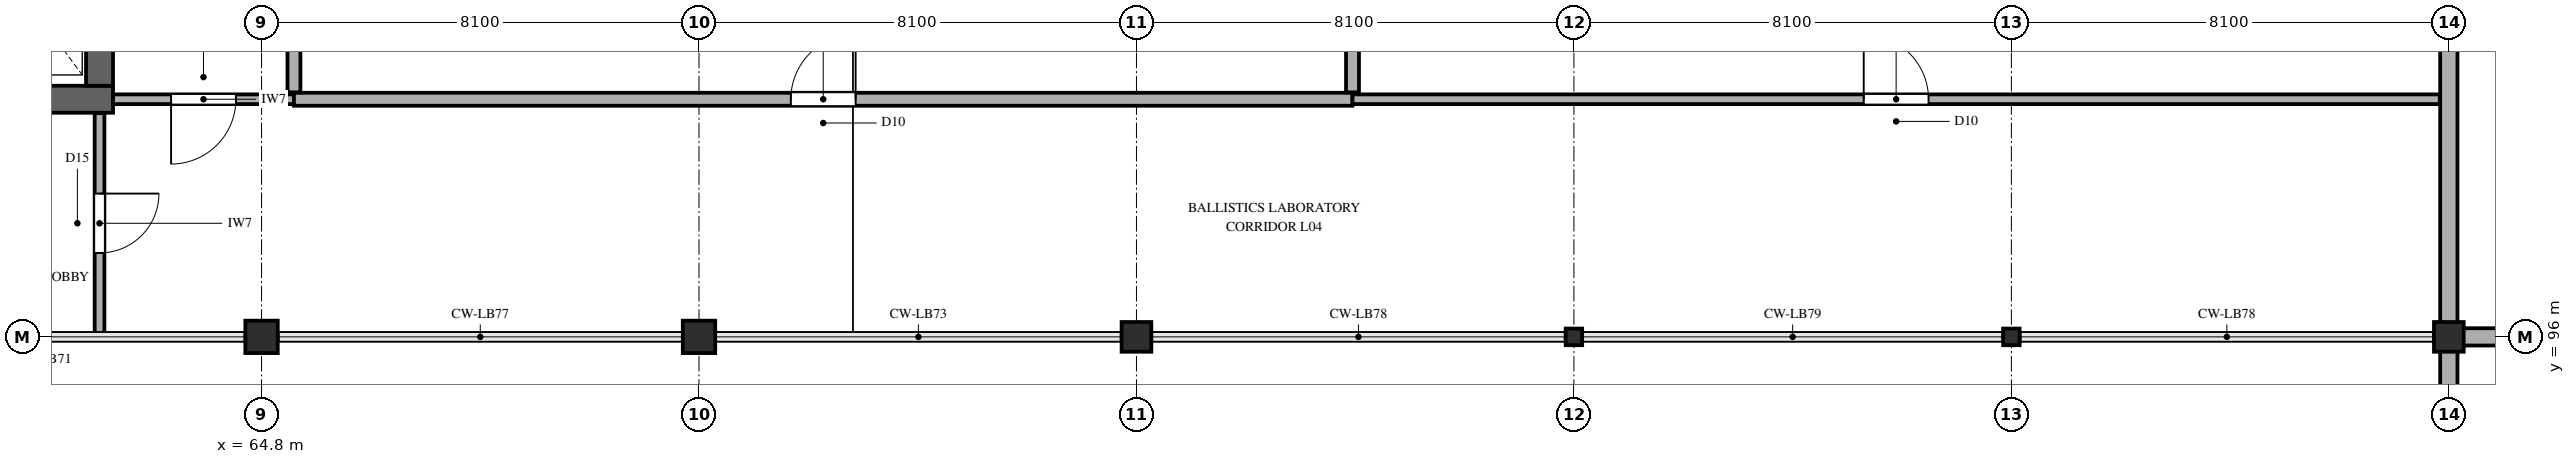
"""IFC4 building model, lengths in metres.
Left out: names, types, materials, properties, quantities, classifications, styles, units other than length and angle.
Written with IfcOpenShell. Run it as: python <this file> out.ifc"""

import sys

from ifc_helpers import new_model, si_unit, direction, frame, frame_2d, origin, origin_2d, place, context, subcontext, project, spatial, rectangle, i_section, extrude, element, fill, save


model = new_model("IFC4")
c1 = context("Model", 3, precision=1e-05, world=origin(), true_north=direction((0.0, 1.0)))
c2 = subcontext(c1, "Body", "Model", "MODEL_VIEW")
j1 = project(units=[si_unit("LENGTHUNIT", "METRE"), si_unit("PLANEANGLEUNIT", "RADIAN")], contexts=[c1])
p1 = place(None, origin())
s1 = spatial("IfcSite", under=j1, at=p1, CompositionType="ELEMENT")
p2 = place(p1, origin())
s2 = spatial("IfcBuilding", under=s1, at=p2, CompositionType="ELEMENT")
p3 = place(p2, frame((0.0, 0.0, 19.8)))
s3 = spatial("IfcBuildingStorey", under=s2, at=p3, CompositionType="ELEMENT", Elevation=19.8)
p4 = place(p3, frame((46.75, 100.4, 0.0), z_axis=(0.0, 0.0, 1.0), x_axis=(1.0, 0.0, 0.0)))
e1 = element("IfcWall", 1, at=p4, inside=s3, PredefinedType="SHEAR", context=c2, shape_type="SweptSolid", body=[
    extrude(rectangle(XDim=15.3, YDim=0.5, at=frame_2d((7.65, 0.0))), origin(), (0.0, 0.0, 1.0), 5.1),
])
p5 = place(p4, frame((1.0, 0.0, 0.0)))
e2 = element("IfcOpeningElement", 2, at=p5, cuts=e1, PredefinedType="OPENING", context=c2, shape_type="SweptSolid", body=[
    extrude(rectangle(XDim=1.15, YDim=2.25, at=frame_2d((0.575, 1.125))), frame((0.0, 0.26, 0.0), z_axis=(0.0, -1.0, 0.0), x_axis=(1.0, 0.0, 0.0)), (0.0, 0.0, 1.0), 0.52),
])
p6 = place(p4, frame((10.282, 0.0, 0.0)))
e3 = element("IfcOpeningElement", 3, at=p6, cuts=e1, PredefinedType="OPENING", context=c2, shape_type="SweptSolid", body=[
    extrude(rectangle(XDim=1.1, YDim=2.2, at=frame_2d((0.55, 1.1))), frame((0.0, 0.26, 0.0), z_axis=(0.0, -1.0, 0.0), x_axis=(1.0, 0.0, 0.0)), (0.0, 0.0, 1.0), 0.52),
])
p7 = place(p4, frame((12.998, 0.0, 0.0)))
e4 = element("IfcOpeningElement", 4, at=p7, cuts=e1, PredefinedType="OPENING", context=c2, shape_type="SweptSolid", body=[
    extrude(rectangle(XDim=1.1, YDim=2.2, at=frame_2d((0.55, 1.1))), frame((0.0, 0.26, 0.0), z_axis=(0.0, -1.0, 0.0), x_axis=(1.0, 0.0, 0.0)), (0.0, 0.0, 1.0), 0.52),
])
p8 = place(p3, frame((61.8, 100.65, 0.0), z_axis=(0.0, 0.0, 1.0), x_axis=(0.0, 1.0, 0.0)))
e5 = element("IfcWall", 5, at=p8, inside=s3, PredefinedType="SHEAR", context=c2, shape_type="SweptSolid", body=[
    extrude(rectangle(XDim=7.9, YDim=0.5, at=frame_2d((3.95, 0.0))), origin(), (0.0, 0.0, 1.0), 5.1),
])
for number, where, z_axis, x_axis in (
    (6, (64.8, 96.0, 0.0), (0.0, 0.0, 1.0), (1.0, 0.0, 0.0)),
    (7, (72.9, 96.0, 0.0), (0.0, 0.0, 1.0), (1.0, 0.0, 0.0)),
):
    element("IfcColumn", number, at=place(p3, frame(where, z_axis=z_axis, x_axis=x_axis)), inside=s3, PredefinedType="COLUMN", context=c2, shape_type="SweptSolid", body=[
        extrude(rectangle(XDim=0.6, YDim=0.6, at=origin_2d()), origin(), (0.0, 0.0, 1.0), 5.1),
    ])
p9 = place(p3, frame((81.0, 96.0, 0.0), z_axis=(0.0, 0.0, 1.0), x_axis=(1.0, 0.0, 0.0)))
e8 = element("IfcColumn", 8, at=p9, inside=s3, PredefinedType="COLUMN", context=c2, shape_type="SweptSolid", body=[
    extrude(rectangle(XDim=0.55, YDim=0.55, at=origin_2d()), origin(), (0.0, 0.0, 1.0), 5.1),
])
p10 = place(p3, frame((89.1, 96.0, 0.0), z_axis=(0.0, 0.0, 1.0), x_axis=(1.0, 0.0, 0.0)))
e9 = element("IfcColumn", 9, at=p10, inside=s3, PredefinedType="COLUMN", context=c2, shape_type="SweptSolid", body=[
    extrude(i_section(OverallWidth=0.305, OverallDepth=0.308, WebThickness=0.01, FlangeThickness=0.015, FilletRadius=0.015, at=origin_2d()), origin(), (0.0, 0.0, 1.0), 5.1),
])
p11 = place(p3, frame((97.2, 96.0, 0.0), z_axis=(0.0, 0.0, 1.0), x_axis=(1.0, 0.0, 0.0)))
e10 = element("IfcColumn", 10, at=p11, inside=s3, PredefinedType="COLUMN", context=c2, shape_type="SweptSolid", body=[
    extrude(i_section(OverallWidth=0.305, OverallDepth=0.308, WebThickness=0.01, FlangeThickness=0.015, FilletRadius=0.015, at=origin_2d()), origin(), (0.0, 0.0, 1.0), 4.76),
])
p12 = place(p3, frame((105.3, 96.0, 0.0), z_axis=(0.0, 0.0, 1.0), x_axis=(1.0, 0.0, 0.0)))
e11 = element("IfcColumn", 11, at=p12, inside=s3, PredefinedType="COLUMN", context=c2, shape_type="SweptSolid", body=[
    extrude(rectangle(XDim=0.55, YDim=0.55, at=origin_2d()), origin(), (0.0, 0.0, 1.0), 4.76),
])
p13 = place(p3, frame((105.3, 96.18, 0.0), z_axis=(0.0, 0.0, 1.0), x_axis=(0.0, 1.0, 0.0)))
e12 = element("IfcWall", 12, at=p13, inside=s3, PredefinedType="SOLIDWALL", context=c2, shape_type="SweptSolid", body=[
    extrude(rectangle(XDim=15.82, YDim=0.32, at=frame_2d((7.91, 0.0))), origin(), (0.0, 0.0, 1.0), 4.289),
])
p14 = place(p3, frame((117.54, 96.0, 0.0), z_axis=(0.0, 0.0, 1.0), x_axis=(-1.0, 0.0, 0.0)))
e13 = element("IfcWall", 13, at=p14, inside=s3, PredefinedType="SOLIDWALL", context=c2, shape_type="SweptSolid", body=[
    extrude(rectangle(XDim=12.06, YDim=0.32, at=frame_2d((6.03, 0.0))), origin(), (0.0, 0.0, 1.0), 4.86),
])
p15 = place(p14, frame((6.75, 0.0, 0.95)))
e14 = element("IfcOpeningElement", 14, at=p15, cuts=e13, PredefinedType="OPENING", context=c2, shape_type="SweptSolid", body=[
    extrude(rectangle(XDim=2.1, YDim=1.8, at=frame_2d((1.05, 0.9))), frame((0.0, 0.17, 0.0), z_axis=(0.0, -1.0, 0.0), x_axis=(1.0, 0.0, 0.0)), (0.0, 0.0, 1.0), 0.34),
])
p16 = place(p3, frame((105.3, 95.82, 0.0), z_axis=(0.0, 0.0, 1.0), x_axis=(0.0, -1.0, 0.0)))
e15 = element("IfcWall", 15, at=p16, inside=s3, PredefinedType="SOLIDWALL", context=c2, shape_type="SweptSolid", body=[
    extrude(rectangle(XDim=13.273, YDim=0.32, at=frame_2d((6.637, 0.0))), origin(), (0.0, 0.0, 1.0), 4.86),
])
p17 = place(p16, frame((3.6, 0.0, 0.95)))
e16 = element("IfcOpeningElement", 16, at=p17, cuts=e15, PredefinedType="OPENING", context=c2, shape_type="SweptSolid", body=[
    extrude(rectangle(XDim=2.25, YDim=1.8, at=frame_2d((1.125, 0.9))), frame((0.0, 0.17, 0.0), z_axis=(0.0, -1.0, 0.0), x_axis=(1.0, 0.0, 0.0)), (0.0, 0.0, 1.0), 0.34),
])
p18 = place(p3, frame((62.05, 100.4, 0.0), z_axis=(0.0, 0.0, 1.0), x_axis=(1.0, 0.0, 0.0)))
e17 = element("IfcWall", 17, at=p18, inside=s3, PredefinedType="PARTITIONING", context=c2, shape_type="SweptSolid", body=[
    extrude(rectangle(XDim=3.35, YDim=0.18, at=frame_2d((1.675, 0.0))), origin(), (0.0, 0.0, 1.0), 4.86),
])
p19 = place(p18, frame((1.075, 0.0, 0.0)))
e18 = element("IfcOpeningElement", 18, at=p19, cuts=e17, PredefinedType="OPENING", context=c2, shape_type="SweptSolid", body=[
    extrude(rectangle(XDim=1.2, YDim=2.2, at=frame_2d((0.6, 1.1))), frame((0.0, 0.1, 0.0), z_axis=(0.0, -1.0, 0.0), x_axis=(1.0, 0.0, 0.0)), (0.0, 0.0, 1.0), 0.2),
])
p20 = place(p3, frame((65.4, 100.4, 0.0), z_axis=(0.0, 0.0, 1.0), x_axis=(1.0, 0.0, 0.0)))
e19 = element("IfcWall", 19, at=p20, inside=s3, PredefinedType="PARTITIONING", context=c2, shape_type="SweptSolid", body=[
    extrude(rectangle(XDim=19.6, YDim=0.24, at=frame_2d((9.8, 0.0))), origin(), (0.0, 0.0, 1.0), 4.86),
])
p21 = place(p20, frame((9.2, 0.0, 0.0)))
e20 = element("IfcOpeningElement", 20, at=p21, cuts=e19, PredefinedType="OPENING", context=c2, shape_type="SweptSolid", body=[
    extrude(rectangle(XDim=1.2, YDim=2.3, at=frame_2d((0.6, 1.15))), frame((0.0, 0.13, 0.0), z_axis=(0.0, -1.0, 0.0), x_axis=(1.0, 0.0, 0.0)), (0.0, 0.0, 1.0), 0.26),
])
p22 = place(p3, frame((85.0, 100.4, 0.0), z_axis=(0.0, 0.0, 1.0), x_axis=(1.0, 0.0, 0.0)))
e21 = element("IfcWall", 21, at=p22, inside=s3, PredefinedType="PARTITIONING", context=c2, shape_type="SweptSolid", body=[
    extrude(rectangle(XDim=20.132, YDim=0.18, at=frame_2d((10.066, 0.0))), origin(), (0.0, 0.0, 1.0), 4.86),
])
p23 = place(p22, frame((9.466, 0.0, 0.0)))
e22 = element("IfcOpeningElement", 22, at=p23, cuts=e21, PredefinedType="OPENING", context=c2, shape_type="SweptSolid", body=[
    extrude(rectangle(XDim=1.2, YDim=2.3, at=frame_2d((0.6, 1.15))), frame((0.0, 0.1, 0.0), z_axis=(0.0, -1.0, 0.0), x_axis=(1.0, 0.0, 0.0)), (0.0, 0.0, 1.0), 0.2),
])
p24 = place(p3, frame((61.8, 96.065, 0.0), z_axis=(0.0, 0.0, 1.0), x_axis=(0.0, 1.0, 0.0)))
e23 = element("IfcWall", 23, at=p24, inside=s3, PredefinedType="PARTITIONING", context=c2, shape_type="SweptSolid", body=[
    extrude(rectangle(XDim=4.077, YDim=0.18, at=frame_2d((2.039, 0.0))), origin(), (0.0, 0.0, 1.0), 4.86),
])
p25 = place(p24, frame((1.489, 0.0, 0.0)))
e24 = element("IfcOpeningElement", 24, at=p25, cuts=e23, PredefinedType="OPENING", context=c2, shape_type="SweptSolid", body=[
    extrude(rectangle(XDim=1.1, YDim=2.2, at=frame_2d((0.55, 1.1))), frame((0.0, 0.1, 0.0), z_axis=(0.0, -1.0, 0.0), x_axis=(1.0, 0.0, 0.0)), (0.0, 0.0, 1.0), 0.2),
])
p26 = place(p3, frame((65.4, 100.528, 0.0), z_axis=(0.0, 0.0, 1.0), x_axis=(0.0, 1.0, 0.0)))
e25 = element("IfcWall", 25, at=p26, inside=s3, PredefinedType="PARTITIONING", context=c2, shape_type="SweptSolid", body=[
    extrude(rectangle(XDim=5.657, YDim=0.24, at=frame_2d((2.829, 0.0))), origin(), (0.0, 0.0, 1.0), 4.86),
])
p27 = place(p3, frame((85.0, 100.528, 0.0), z_axis=(0.0, 0.0, 1.0), x_axis=(0.0, 1.0, 0.0)))
e26 = element("IfcWall", 26, at=p27, inside=s3, PredefinedType="PARTITIONING", context=c2, shape_type="SweptSolid", body=[
    extrude(rectangle(XDim=5.657, YDim=0.24, at=frame_2d((2.829, 0.0))), origin(), (0.0, 0.0, 1.0), 4.498),
])
p28 = place(p19, frame((1.2, 0.0, 0.0), z_axis=(0.0, 0.0, 1.0), x_axis=(-1.0, 0.0, 0.0)))
e27 = element("IfcDoor", 27, at=p28, inside=s3, OperationType="SINGLE_SWING_LEFT", PredefinedType="DOOR", context=c2, shape_type="SweptSolid", body=[
    extrude(rectangle(XDim=1.2, YDim=2.2, at=frame_2d((0.6, 1.1))), frame((0.0, 0.025, 0.0), z_axis=(0.0, -1.0, 0.0), x_axis=(1.0, 0.0, 0.0)), (0.0, 0.0, 1.0), 0.05),
])
fill(e18, e27)
p29 = place(p21, origin())
e28 = element("IfcDoor", 28, at=p29, inside=s3, OperationType="SINGLE_SWING_RIGHT", PredefinedType="DOOR", context=c2, shape_type="SweptSolid", body=[
    extrude(rectangle(XDim=1.2, YDim=2.3, at=frame_2d((0.6, 1.15))), frame((0.0, 0.025, 0.0), z_axis=(0.0, -1.0, 0.0), x_axis=(1.0, 0.0, 0.0)), (0.0, 0.0, 1.0), 0.05),
])
fill(e20, e28)
p30 = place(p23, origin())
e29 = element("IfcDoor", 29, at=p30, inside=s3, OperationType="SINGLE_SWING_LEFT", PredefinedType="DOOR", context=c2, shape_type="SweptSolid", body=[
    extrude(rectangle(XDim=1.2, YDim=2.3, at=frame_2d((0.6, 1.15))), frame((0.0, 0.025, 0.0), z_axis=(0.0, -1.0, 0.0), x_axis=(1.0, 0.0, 0.0)), (0.0, 0.0, 1.0), 0.05),
])
fill(e22, e29)
p31 = place(p25, frame((1.1, 0.0, 0.0), z_axis=(0.0, 0.0, 1.0), x_axis=(-1.0, 0.0, 0.0)))
e30 = element("IfcDoor", 30, at=p31, inside=s3, OperationType="SINGLE_SWING_RIGHT", PredefinedType="DOOR", context=c2, shape_type="SweptSolid", body=[
    extrude(rectangle(XDim=1.1, YDim=2.2, at=frame_2d((0.55, 1.1))), frame((0.0, 0.025, 0.0), z_axis=(0.0, -1.0, 0.0), x_axis=(1.0, 0.0, 0.0)), (0.0, 0.0, 1.0), 0.05),
])
fill(e24, e30)
save(model, sys.argv[1])
